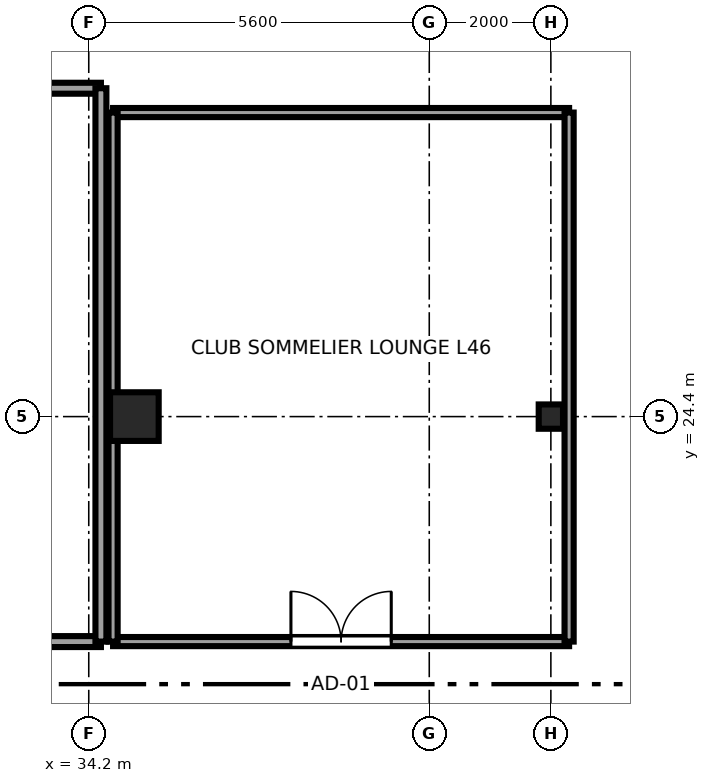
"""IFC4 building model, lengths in metres.
Left out: names, types, materials, properties, quantities, classifications, styles, units other than length and angle.
Written with IfcOpenShell. Run it as: python <this file> out.ifc"""

import sys

from ifc_helpers import new_model, si_unit, direction, frame, frame_2d, origin, origin_2d, place, context, subcontext, project, spatial, rectangle, i_section, extrude, source, transform, mapped, element, fill, save


model = new_model("IFC4")
c1 = context("Model", 3, precision=1e-05, world=origin(), true_north=direction((0.0, 1.0)))
c2 = subcontext(c1, "Body", "Model", "MODEL_VIEW")
j1 = project(units=[si_unit("LENGTHUNIT", "METRE"), si_unit("PLANEANGLEUNIT", "RADIAN")], contexts=[c1])
p1 = place(None, origin())
s1 = spatial("IfcSite", under=j1, at=p1, CompositionType="ELEMENT")
p2 = place(p1, origin())
s2 = spatial("IfcBuilding", under=s1, at=p2, CompositionType="ELEMENT")
p3 = place(p2, frame((0.0, 0.0, 175.45)))
s3 = spatial("IfcBuildingStorey", under=s2, at=p3, CompositionType="ELEMENT", Elevation=175.45)
m1 = source(origin(), c2, "Body", "SweptSolid", [
    extrude(rectangle(XDim=0.8, YDim=0.8, at=origin_2d()), origin(), (0.0, 0.0, 1.0), 3.55),
])
p4 = place(p3, frame((34.95, 24.4, 0.0), z_axis=(0.0, 0.0, 1.0), x_axis=(1.0, 0.0, 0.0)))
e1 = element("IfcColumn", 1, at=p4, inside=s3, PredefinedType="COLUMN", context=c2, shape_type="MappedRepresentation", body=[
    mapped(m1, transform((0.0, 0.0, 0.0), x_axis=(1.0, 0.0, 0.0), y_axis=(0.0, 1.0, 0.0), z_axis=(0.0, 0.0, 1.0), scale=1.0)),
])
m2 = source(origin(), c2, "Body", "SweptSolid", [
    extrude(i_section(OverallWidth=0.4, OverallDepth=0.4, WebThickness=0.02, FlangeThickness=0.035, at=origin_2d()), origin(), (0.0, 0.0, 1.0), 3.55),
])
p5 = place(p3, frame((41.8, 24.4, 0.0), z_axis=(0.0, 0.0, 1.0), x_axis=(1.0, 0.0, 0.0)))
e2 = element("IfcColumn", 2, at=p5, inside=s3, PredefinedType="COLUMN", context=c2, shape_type="MappedRepresentation", body=[
    mapped(m2, transform((0.0, 0.0, 0.0), x_axis=(1.0, 0.0, 0.0), y_axis=(0.0, 1.0, 0.0), z_axis=(0.0, 0.0, 1.0), scale=1.0)),
])
p6 = place(p3, frame((27.1, 20.7, 0.0), z_axis=(0.0, 0.0, 1.0), x_axis=(1.0, 0.0, 0.0)))
e3 = element("IfcWall", 3, at=p6, inside=s3, PredefinedType="PARTITIONING", context=c2, shape_type="SweptSolid", body=[
    extrude(rectangle(XDim=7.3, YDim=0.18, at=frame_2d((3.65, 0.0))), origin(), (0.0, 0.0, 1.0), 3.37),
])
p7 = place(p6, frame((2.825, 0.0, 0.0)))
e4 = element("IfcOpeningElement", 4, at=p7, cuts=e3, PredefinedType="OPENING", context=c2, shape_type="SweptSolid", body=[
    extrude(rectangle(XDim=1.65, YDim=2.15, at=frame_2d((0.825, 1.075))), frame((0.0, 0.1, 0.0), z_axis=(0.0, -1.0, 0.0), x_axis=(1.0, 0.0, 0.0)), (0.0, 0.0, 1.0), 0.2),
])
p8 = place(p3, frame((27.1, 29.8, 0.0), z_axis=(0.0, 0.0, 1.0), x_axis=(1.0, 0.0, 0.0)))
e5 = element("IfcWall", 5, at=p8, inside=s3, PredefinedType="PARTITIONING", context=c2, shape_type="SweptSolid", body=[
    extrude(rectangle(XDim=7.3, YDim=0.18, at=frame_2d((3.65, 0.0))), origin(), (0.0, 0.0, 1.0), 3.37),
])
p9 = place(p3, frame((34.4, 20.7, 0.0), z_axis=(0.0, 0.0, 1.0), x_axis=(0.0, 1.0, 0.0)))
e6 = element("IfcWall", 6, at=p9, inside=s3, PredefinedType="PARTITIONING", context=c2, shape_type="SweptSolid", body=[
    extrude(rectangle(XDim=9.1, YDim=0.18, at=frame_2d((4.55, 0.0))), origin(), (0.0, 0.0, 1.0), 3.37),
])
p10 = place(p3, frame((34.6, 20.7, 0.0), z_axis=(0.0, 0.0, 1.0), x_axis=(1.0, 0.0, 0.0)))
e7 = element("IfcWall", 7, at=p10, inside=s3, PredefinedType="PARTITIONING", context=c2, shape_type="SweptSolid", body=[
    extrude(rectangle(XDim=7.5, YDim=0.15, at=frame_2d((3.75, 0.0))), origin(), (0.0, 0.0, 1.0), 3.37),
])
p11 = place(p10, frame((2.925, 0.0, 0.0)))
e8 = element("IfcOpeningElement", 8, at=p11, cuts=e7, PredefinedType="OPENING", context=c2, shape_type="SweptSolid", body=[
    extrude(rectangle(XDim=1.65, YDim=2.15, at=frame_2d((0.825, 1.075))), frame((0.0, 0.085, 0.0), z_axis=(0.0, -1.0, 0.0), x_axis=(1.0, 0.0, 0.0)), (0.0, 0.0, 1.0), 0.17),
])
p12 = place(p3, frame((34.6, 29.4, 0.0), z_axis=(0.0, 0.0, 1.0), x_axis=(1.0, 0.0, 0.0)))
e9 = element("IfcWall", 9, at=p12, inside=s3, PredefinedType="PARTITIONING", context=c2, shape_type="SweptSolid", body=[
    extrude(rectangle(XDim=7.5, YDim=0.15, at=frame_2d((3.75, 0.0))), origin(), (0.0, 0.0, 1.0), 3.37),
])
p13 = place(p3, frame((34.6, 20.7, 0.0), z_axis=(0.0, 0.0, 1.0), x_axis=(0.0, 1.0, 0.0)))
e10 = element("IfcWall", 10, at=p13, inside=s3, PredefinedType="PARTITIONING", context=c2, shape_type="SweptSolid", body=[
    extrude(rectangle(XDim=8.7, YDim=0.15, at=frame_2d((4.35, 0.0))), origin(), (0.0, 0.0, 1.0), 3.37),
])
p14 = place(p3, frame((42.1, 20.7, 0.0), z_axis=(0.0, 0.0, 1.0), x_axis=(0.0, 1.0, 0.0)))
e11 = element("IfcWall", 11, at=p14, inside=s3, PredefinedType="PARTITIONING", context=c2, shape_type="SweptSolid", body=[
    extrude(rectangle(XDim=8.7, YDim=0.15, at=frame_2d((4.35, 0.0))), origin(), (0.0, 0.0, 1.0), 2.16),
])
m3 = source(origin(), c2, "Body", "SweptSolid", [
    extrude(rectangle(XDim=1.65, YDim=2.15, at=frame_2d((0.825, 1.075))), frame((0.0, 0.025, 0.0), z_axis=(0.0, -1.0, 0.0), x_axis=(1.0, 0.0, 0.0)), (0.0, 0.0, 1.0), 0.05),
])
p15 = place(p11, origin())
e12 = element("IfcDoor", 12, at=p15, inside=s3, OperationType="DOUBLE_DOOR_SINGLE_SWING", PredefinedType="DOOR", context=c2, shape_type="MappedRepresentation", body=[
    mapped(m3, transform((0.0, 0.0, 0.0), x_axis=(1.0, 0.0, 0.0), y_axis=(0.0, 1.0, 0.0), z_axis=(0.0, 0.0, 1.0), scale=1.0)),
])
fill(e8, e12)
save(model, sys.argv[1])
